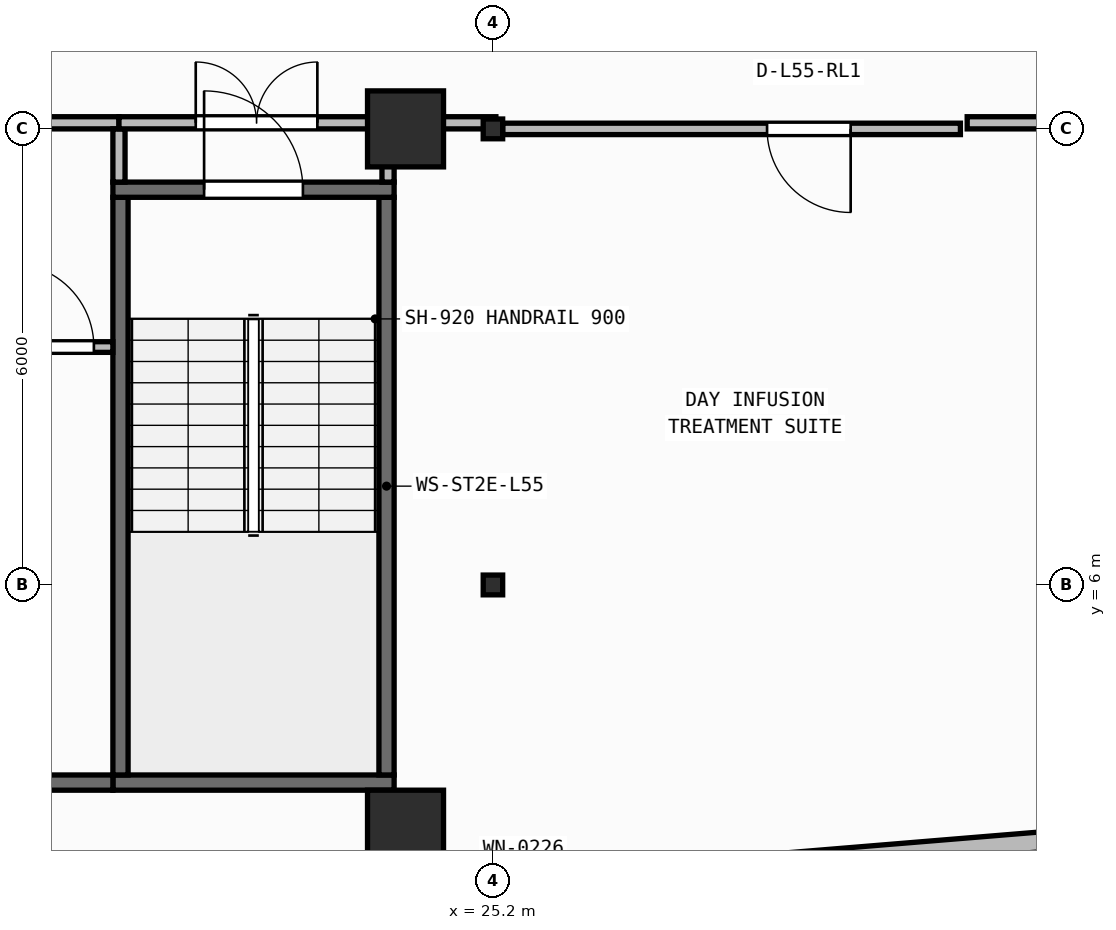
"""IFC4 building model, lengths in metres.
Left out: names, types, materials, properties, quantities, classifications, styles, units other than length and angle.
Written with IfcOpenShell. Run it as: python <this file> out.ifc"""

import sys

from ifc_helpers import new_model, si_unit, direction, frame, frame_2d, origin, origin_2d, place, context, subcontext, project, spatial, rectangle, i_section, extrude, element, fill, save


model = new_model("IFC4")
c1 = context("Model", 3, precision=1e-05, world=origin(), true_north=direction((0.0, 1.0)))
c2 = subcontext(c1, "Body", "Model", "MODEL_VIEW")
j1 = project(units=[si_unit("LENGTHUNIT", "METRE"), si_unit("PLANEANGLEUNIT", "RADIAN")], contexts=[c1])
p1 = place(None, origin())
s1 = spatial("IfcSite", under=j1, at=p1, CompositionType="ELEMENT")
p2 = place(p1, origin())
s2 = spatial("IfcBuilding", under=s1, at=p2, CompositionType="ELEMENT")
p3 = place(p2, frame((0.0, 0.0, 223.7)))
s3 = spatial("IfcBuildingStorey", under=s2, at=p3, CompositionType="ELEMENT", Elevation=223.7)
p4 = place(p3, frame((24.05, 2.8, 0.0), z_axis=(0.0, 0.0, 1.0), x_axis=(1.0, 0.0, 0.0)))
e1 = element("IfcColumn", 1, at=p4, inside=s3, PredefinedType="COLUMN", context=c2, shape_type="SweptSolid", body=[
    extrude(rectangle(XDim=1.0, YDim=1.0, at=origin_2d()), origin(), (0.0, 0.0, 1.0), 3.95),
])
p5 = place(p3, frame((25.2, 6.0, 0.0), z_axis=(0.0, 0.0, 1.0), x_axis=(1.0, 0.0, 0.0)))
e2 = element("IfcColumn", 2, at=p5, inside=s3, PredefinedType="COLUMN", context=c2, shape_type="SweptSolid", body=[
    extrude(i_section(OverallWidth=0.256, OverallDepth=0.26, WebThickness=0.01, FlangeThickness=0.017, FilletRadius=0.013, at=origin_2d()), origin(), (0.0, 0.0, 1.0), 3.95),
])
p6 = place(p3, frame((24.05, 12.0, 0.0), z_axis=(0.0, 0.0, 1.0), x_axis=(1.0, 0.0, 0.0)))
e3 = element("IfcColumn", 3, at=p6, inside=s3, PredefinedType="COLUMN", context=c2, shape_type="SweptSolid", body=[
    extrude(rectangle(XDim=1.0, YDim=1.0, at=origin_2d()), origin(), (0.0, 0.0, 1.0), 3.95),
])
p7 = place(p3, frame((25.2, 12.0, 0.0), z_axis=(0.0, 0.0, 1.0), x_axis=(1.0, 0.0, 0.0)))
e4 = element("IfcColumn", 4, at=p7, inside=s3, PredefinedType="COLUMN", context=c2, shape_type="SweptSolid", body=[
    extrude(i_section(OverallWidth=0.256, OverallDepth=0.26, WebThickness=0.01, FlangeThickness=0.017, FilletRadius=0.013, at=origin_2d()), origin(), (0.0, 0.0, 1.0), 3.95),
])
p8 = place(p3, frame((2.66, 0.174, 0.0), z_axis=(0.0, 0.0, 1.0), x_axis=(0.996634028439, 0.081979347142, 0.0)))
e5 = element("IfcWall", 5, at=p8, inside=s3, PredefinedType="STANDARD", context=c2, shape_type="SweptSolid", body=[
    extrude(rectangle(XDim=46.035, YDim=0.26, at=frame_2d((23.018, 0.0))), origin(), (0.0, 0.0, 1.0), 3.71),
])
p9 = place(p8, frame((21.817, 0.0, 0.9)))
e6 = element("IfcOpeningElement", 6, at=p9, cuts=e5, PredefinedType="OPENING", context=c2, shape_type="SweptSolid", body=[
    extrude(rectangle(XDim=2.4, YDim=1.65, at=frame_2d((1.2, 0.825))), frame((0.0, 0.14, 0.0), z_axis=(0.0, -1.0, 0.0), x_axis=(1.0, 0.0, 0.0)), (0.0, 0.0, 1.0), 0.28),
])
p10 = place(p3, frame((20.2, 3.4, 0.0), z_axis=(0.0, 0.0, 1.0), x_axis=(1.0, 0.0, 0.0)))
e7 = element("IfcWall", 7, at=p10, inside=s3, PredefinedType="SHEAR", context=c2, shape_type="SweptSolid", body=[
    extrude(rectangle(XDim=3.7, YDim=0.2, at=frame_2d((1.85, 0.0))), origin(), (0.0, 0.0, 1.0), 3.71),
])
for number, where, z_axis, x_axis in (
    (8, (20.3, 3.5, 0.0), (0.0, 0.0, 1.0), (0.0, 1.0, 0.0)),
    (9, (23.8, 3.5, 0.0), (0.0, 0.0, 1.0), (0.0, 1.0, 0.0)),
):
    element("IfcWall", number, at=place(p3, frame(where, z_axis=z_axis, x_axis=x_axis)), inside=s3, PredefinedType="SHEAR", context=c2, shape_type="SweptSolid", body=[
        extrude(rectangle(XDim=7.6, YDim=0.2, at=frame_2d((3.8, 0.0))), origin(), (0.0, 0.0, 1.0), 3.71),
    ])
p11 = place(p3, frame((20.2, 11.2, 0.0), z_axis=(0.0, 0.0, 1.0), x_axis=(1.0, 0.0, 0.0)))
e10 = element("IfcWall", 10, at=p11, inside=s3, PredefinedType="SHEAR", context=c2, shape_type="SweptSolid", body=[
    extrude(rectangle(XDim=3.7, YDim=0.2, at=frame_2d((1.85, 0.0))), origin(), (0.0, 0.0, 1.0), 3.71),
])
p12 = place(p11, frame((1.2, 0.0, 0.0)))
e11 = element("IfcOpeningElement", 11, at=p12, cuts=e10, PredefinedType="OPENING", context=c2, shape_type="SweptSolid", body=[
    extrude(rectangle(XDim=1.3, YDim=2.15, at=frame_2d((0.65, 1.075))), frame((0.0, 0.11, 0.0), z_axis=(0.0, -1.0, 0.0), x_axis=(1.0, 0.0, 0.0)), (0.0, 0.0, 1.0), 0.22),
])
p13 = place(p3, frame((6.5, 3.4, 0.0), z_axis=(0.0, 0.0, 1.0), x_axis=(1.0, 0.0, 0.0)))
e12 = element("IfcWall", 12, at=p13, inside=s3, PredefinedType="SHEAR", context=c2, shape_type="SweptSolid", body=[
    extrude(rectangle(XDim=13.7, YDim=0.2, at=frame_2d((6.85, 0.0))), origin(), (0.0, 0.0, 1.0), 3.71),
])
p14 = place(p3, frame((18.61, 9.13, 0.0), z_axis=(0.0, 0.0, 1.0), x_axis=(1.0, 0.0, 0.0)))
e13 = element("IfcWall", 13, at=p14, inside=s3, PredefinedType="PARTITIONING", context=c2, shape_type="SweptSolid", body=[
    extrude(rectangle(XDim=1.59, YDim=0.14, at=frame_2d((0.795, 0.0))), origin(), (0.0, 0.0, 1.0), 3.71),
])
p15 = place(p14, frame((0.24, 0.0, 0.0)))
e14 = element("IfcOpeningElement", 14, at=p15, cuts=e13, PredefinedType="OPENING", context=c2, shape_type="SweptSolid", body=[
    extrude(rectangle(XDim=1.1, YDim=2.1, at=frame_2d((0.55, 1.05))), frame((0.0, 0.08, 0.0), z_axis=(0.0, -1.0, 0.0), x_axis=(1.0, 0.0, 0.0)), (0.0, 0.0, 1.0), 0.16),
])
p16 = place(p3, frame((12.58, 12.08, 0.0), z_axis=(0.0, 0.0, 1.0), x_axis=(1.0, 0.0, 0.0)))
e15 = element("IfcWall", 15, at=p16, inside=s3, PredefinedType="PARTITIONING", context=c2, shape_type="SweptSolid", body=[
    extrude(rectangle(XDim=7.7, YDim=0.16, at=frame_2d((3.85, 0.0))), origin(), (0.0, 0.0, 1.0), 3.152),
])
p17 = place(p16, frame((3.05, 0.0, 0.0)))
e16 = element("IfcOpeningElement", 16, at=p17, cuts=e15, PredefinedType="OPENING", context=c2, shape_type="SweptSolid", body=[
    extrude(rectangle(XDim=1.6, YDim=2.05, at=frame_2d((0.8, 1.025))), frame((0.0, 0.09, 0.0), z_axis=(0.0, -1.0, 0.0), x_axis=(1.0, 0.0, 0.0)), (0.0, 0.0, 1.0), 0.18),
])
p18 = place(p3, frame((20.28, 11.3, 0.0), z_axis=(0.0, 0.0, 1.0), x_axis=(0.0, 1.0, 0.0)))
e17 = element("IfcWall", 17, at=p18, inside=s3, PredefinedType="PARTITIONING", context=c2, shape_type="SweptSolid", body=[
    extrude(rectangle(XDim=0.7, YDim=0.16, at=frame_2d((0.35, 0.0))), origin(), (0.0, 0.0, 1.0), 3.71),
])
p19 = place(p3, frame((20.28, 12.08, 0.0), z_axis=(0.0, 0.0, 1.0), x_axis=(1.0, 0.0, 0.0)))
e18 = element("IfcWall", 18, at=p19, inside=s3, PredefinedType="PARTITIONING", context=c2, shape_type="SweptSolid", body=[
    extrude(rectangle(XDim=3.62, YDim=0.16, at=frame_2d((1.81, 0.0))), origin(), (0.0, 0.0, 1.0), 3.152),
])
p20 = place(p19, frame((1.01, 0.0, 0.0)))
e19 = element("IfcOpeningElement", 19, at=p20, cuts=e18, PredefinedType="OPENING", context=c2, shape_type="SweptSolid", body=[
    extrude(rectangle(XDim=1.6, YDim=2.05, at=frame_2d((0.8, 1.025))), frame((0.0, 0.09, 0.0), z_axis=(0.0, -1.0, 0.0), x_axis=(1.0, 0.0, 0.0)), (0.0, 0.0, 1.0), 0.18),
])
p21 = place(p3, frame((23.82, 11.3, 0.0), z_axis=(0.0, 0.0, 1.0), x_axis=(0.0, 1.0, 0.0)))
e20 = element("IfcWall", 20, at=p21, inside=s3, PredefinedType="PARTITIONING", context=c2, shape_type="SweptSolid", body=[
    extrude(rectangle(XDim=0.7, YDim=0.16, at=frame_2d((0.35, 0.0))), origin(), (0.0, 0.0, 1.0), 3.71),
])
p22 = place(p3, frame((31.35, 12.0, 0.0), z_axis=(0.0, 0.0, 1.0), x_axis=(-1.0, 0.0, 0.0)))
e21 = element("IfcWall", 21, at=p22, inside=s3, PredefinedType="PARTITIONING", context=c2, shape_type="SweptSolid", body=[
    extrude(rectangle(XDim=6.022, YDim=0.15, at=frame_2d((3.011, 0.0))), origin(), (0.0, 0.0, 1.0), 3.152),
])
p23 = place(p22, frame((1.444, 0.0, 0.0)))
e22 = element("IfcOpeningElement", 22, at=p23, cuts=e21, PredefinedType="OPENING", context=c2, shape_type="SweptSolid", body=[
    extrude(rectangle(XDim=1.1, YDim=2.1, at=frame_2d((0.55, 1.05))), frame((0.0, 0.085, 0.0), z_axis=(0.0, -1.0, 0.0), x_axis=(1.0, 0.0, 0.0)), (0.0, 0.0, 1.0), 0.17),
])
p24 = place(p3, frame((24.02, 12.08, 0.0), z_axis=(0.0, 0.0, 1.0), x_axis=(1.0, 0.0, 0.0)))
e23 = element("IfcWall", 23, at=p24, inside=s3, PredefinedType="PARTITIONING", context=c2, shape_type="SweptSolid", body=[
    extrude(rectangle(XDim=1.219, YDim=0.16, at=frame_2d((0.609, 0.0))), origin(), (0.0, 0.0, 1.0), 3.152),
])
p25 = place(p3, frame((31.439, 12.08, 0.0), z_axis=(0.0, 0.0, 1.0), x_axis=(1.0, 0.0, 0.0)))
e24 = element("IfcWall", 24, at=p25, inside=s3, PredefinedType="PARTITIONING", context=c2, shape_type="SweptSolid", body=[
    extrude(rectangle(XDim=2.199, YDim=0.16, at=frame_2d((1.1, 0.0))), origin(), (0.0, 0.0, 1.0), 3.152),
])
p26 = place(p12, origin())
e25 = element("IfcDoor", 25, at=p26, inside=s3, OperationType="SINGLE_SWING_LEFT", PredefinedType="DOOR", context=c2, shape_type="SweptSolid", body=[
    extrude(rectangle(XDim=1.3, YDim=2.15, at=frame_2d((0.65, 1.075))), frame((0.0, 0.025, 0.0), z_axis=(0.0, -1.0, 0.0), x_axis=(1.0, 0.0, 0.0)), (0.0, 0.0, 1.0), 0.05),
])
fill(e11, e25)
p27 = place(p15, origin())
e26 = element("IfcDoor", 26, at=p27, inside=s3, OperationType="SINGLE_SWING_LEFT", PredefinedType="DOOR", context=c2, shape_type="SweptSolid", body=[
    extrude(rectangle(XDim=1.1, YDim=2.1, at=frame_2d((0.55, 1.05))), frame((0.0, 0.025, 0.0), z_axis=(0.0, -1.0, 0.0), x_axis=(1.0, 0.0, 0.0)), (0.0, 0.0, 1.0), 0.05),
])
fill(e14, e26)
p28 = place(p20, origin())
e27 = element("IfcDoor", 27, at=p28, inside=s3, OperationType="DOUBLE_DOOR_SINGLE_SWING", PredefinedType="DOOR", context=c2, shape_type="SweptSolid", body=[
    extrude(rectangle(XDim=1.6, YDim=2.05, at=frame_2d((0.8, 1.025))), frame((0.0, 0.025, 0.0), z_axis=(0.0, -1.0, 0.0), x_axis=(1.0, 0.0, 0.0)), (0.0, 0.0, 1.0), 0.05),
])
fill(e19, e27)
p29 = place(p23, origin())
e28 = element("IfcDoor", 28, at=p29, inside=s3, OperationType="SINGLE_SWING_LEFT", PredefinedType="DOOR", context=c2, shape_type="SweptSolid", body=[
    extrude(rectangle(XDim=1.1, YDim=2.1, at=frame_2d((0.55, 1.05))), frame((0.0, 0.025, 0.0), z_axis=(0.0, -1.0, 0.0), x_axis=(1.0, 0.0, 0.0)), (0.0, 0.0, 1.0), 0.05),
])
fill(e22, e28)
save(model, sys.argv[1])
